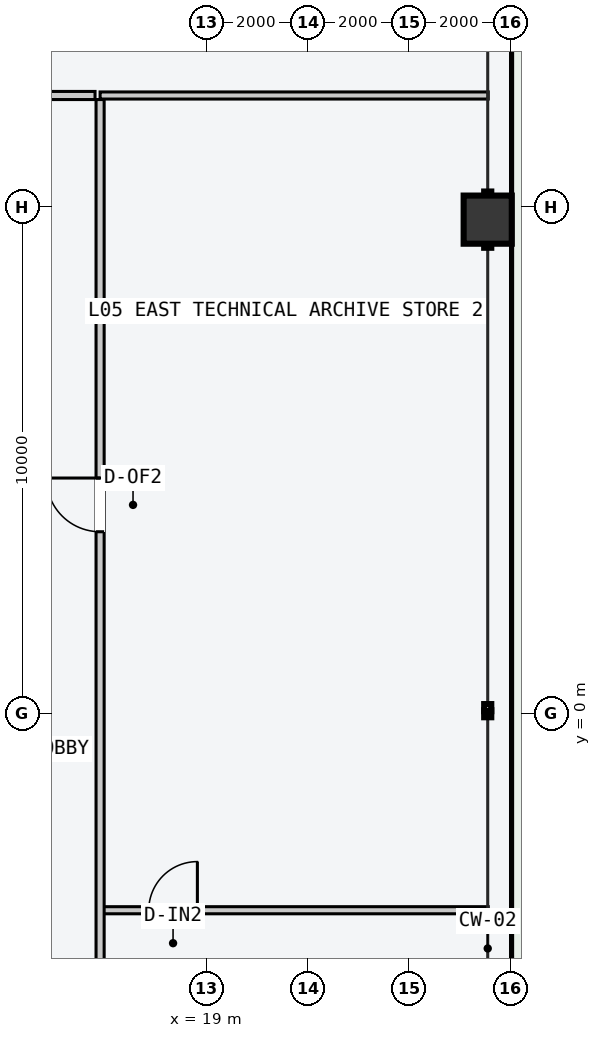
"""IFC4 building model, lengths in metres.
Left out: names, types, materials, properties, quantities, classifications, styles, units other than length and angle.
Written with IfcOpenShell. Run it as: python <this file> out.ifc"""

import sys

from ifc_helpers import new_model, si_unit, direction, frame, frame_2d, origin, origin_2d, place, context, subcontext, project, spatial, rectangle, hollow_rectangle, extrude, element, fill, save


model = new_model("IFC4")
c1 = context("Model", 3, precision=1e-05, world=origin(), true_north=direction((0.0, 1.0)))
c2 = subcontext(c1, "Body", "Model", "MODEL_VIEW")
j1 = project(units=[si_unit("LENGTHUNIT", "METRE"), si_unit("PLANEANGLEUNIT", "RADIAN")], contexts=[c1])
p1 = place(None, origin())
s1 = spatial("IfcSite", under=j1, at=p1, CompositionType="ELEMENT")
p2 = place(p1, origin())
s2 = spatial("IfcBuilding", under=s1, at=p2, CompositionType="ELEMENT")
p3 = place(p2, frame((0.0, 0.0, 24.0)))
s3 = spatial("IfcBuildingStorey", under=s2, at=p3, CompositionType="ELEMENT", Elevation=24.0)
p4 = place(p3, frame((24.55, 9.75, -0.2), z_axis=(0.0, 0.0, 1.0), x_axis=(0.0, 1.0, 0.0)))
e1 = element("IfcColumn", 1, at=p4, inside=s3, PredefinedType="COLUMN", context=c2, shape_type="SweptSolid", body=[
    extrude(hollow_rectangle(XDim=0.95, YDim=0.95, WallThickness=0.048, at=origin_2d()), origin(), (0.0, 0.0, 1.0), 3.8),
])
p5 = place(p3, frame((-16.8, 12.2, 0.0), z_axis=(0.0, 0.0, 1.0), x_axis=(1.0, 0.0, 0.0)))
e2 = element("IfcWall", 2, at=p5, inside=s3, PredefinedType="PARTITIONING", context=c2, shape_type="SweptSolid", body=[
    extrude(rectangle(XDim=33.6, YDim=0.16, at=frame_2d((16.8, 0.0))), origin(), (0.0, 0.0, 1.0), 1.74),
])
p6 = place(p3, frame((16.9, 12.2, 0.0), z_axis=(0.0, 0.0, 1.0), x_axis=(1.0, 0.0, 0.0)))
e3 = element("IfcWall", 3, at=p6, inside=s3, PredefinedType="PARTITIONING", context=c2, shape_type="SweptSolid", body=[
    extrude(rectangle(XDim=7.66, YDim=0.14, at=frame_2d((3.83, 0.0))), origin(), (0.0, 0.0, 1.0), 1.74),
])
p7 = place(p3, frame((16.96, -3.878, 0.0), z_axis=(0.0, 0.0, 1.0), x_axis=(1.0, 0.0, 0.0)))
e4 = element("IfcWall", 4, at=p7, inside=s3, PredefinedType="PARTITIONING", context=c2, shape_type="SweptSolid", body=[
    extrude(rectangle(XDim=7.6, YDim=0.14, at=frame_2d((3.8, 0.0))), origin(), (0.0, 0.0, 1.0), 3.4),
])
p8 = place(p7, frame((0.9, 0.0, 0.0)))
e5 = element("IfcOpeningElement", 5, at=p8, cuts=e4, PredefinedType="OPENING", context=c2, shape_type="SweptSolid", body=[
    extrude(rectangle(XDim=0.96, YDim=2.18, at=frame_2d((0.48, 1.09))), frame((0.0, 0.08, 0.0), z_axis=(0.0, -1.0, 0.0), x_axis=(1.0, 0.0, 0.0)), (0.0, 0.0, 1.0), 0.16),
])
p9 = place(p3, frame((16.9, -12.12, 0.0), z_axis=(0.0, 0.0, 1.0), x_axis=(0.0, 1.0, 0.0)))
e6 = element("IfcWall", 6, at=p9, inside=s3, PredefinedType="PARTITIONING", context=c2, shape_type="SweptSolid", body=[
    extrude(rectangle(XDim=24.24, YDim=0.16, at=frame_2d((12.12, 0.0))), origin(), (0.0, 0.0, 1.0), 3.4),
])
p10 = place(p9, frame((3.611, 0.0, 0.0)))
e7 = element("IfcOpeningElement", 7, at=p10, cuts=e6, PredefinedType="OPENING", context=c2, shape_type="SweptSolid", body=[
    extrude(rectangle(XDim=1.02, YDim=2.2, at=frame_2d((0.51, 1.1))), frame((0.0, 0.09, 0.0), z_axis=(0.0, -1.0, 0.0), x_axis=(1.0, 0.0, 0.0)), (0.0, 0.0, 1.0), 0.18),
])
p11 = place(p9, frame((15.711, 0.0, 0.0)))
e8 = element("IfcOpeningElement", 8, at=p11, cuts=e6, PredefinedType="OPENING", context=c2, shape_type="SweptSolid", body=[
    extrude(rectangle(XDim=1.06, YDim=2.2, at=frame_2d((0.53, 1.1))), frame((0.0, 0.09, 0.0), z_axis=(0.0, -1.0, 0.0), x_axis=(1.0, 0.0, 0.0)), (0.0, 0.0, 1.0), 0.18),
])
p12 = place(p8, origin())
e9 = element("IfcDoor", 9, at=p12, inside=s3, OperationType="SINGLE_SWING_RIGHT", PredefinedType="DOOR", context=c2, shape_type="SweptSolid", body=[
    extrude(rectangle(XDim=0.96, YDim=2.18, at=frame_2d((0.48, 1.09))), frame((0.0, 0.025, 0.0), z_axis=(0.0, -1.0, 0.0), x_axis=(1.0, 0.0, 0.0)), (0.0, 0.0, 1.0), 0.05),
])
fill(e5, e9)
p13 = place(p11, origin())
e10 = element("IfcDoor", 10, at=p13, inside=s3, OperationType="SINGLE_SWING_RIGHT", PredefinedType="DOOR", context=c2, shape_type="SweptSolid", body=[
    extrude(rectangle(XDim=1.06, YDim=2.2, at=frame_2d((0.53, 1.1))), frame((0.0, 0.025, 0.0), z_axis=(0.0, -1.0, 0.0), x_axis=(1.0, 0.0, 0.0)), (0.0, 0.0, 1.0), 0.05),
])
fill(e8, e10)
save(model, sys.argv[1])
